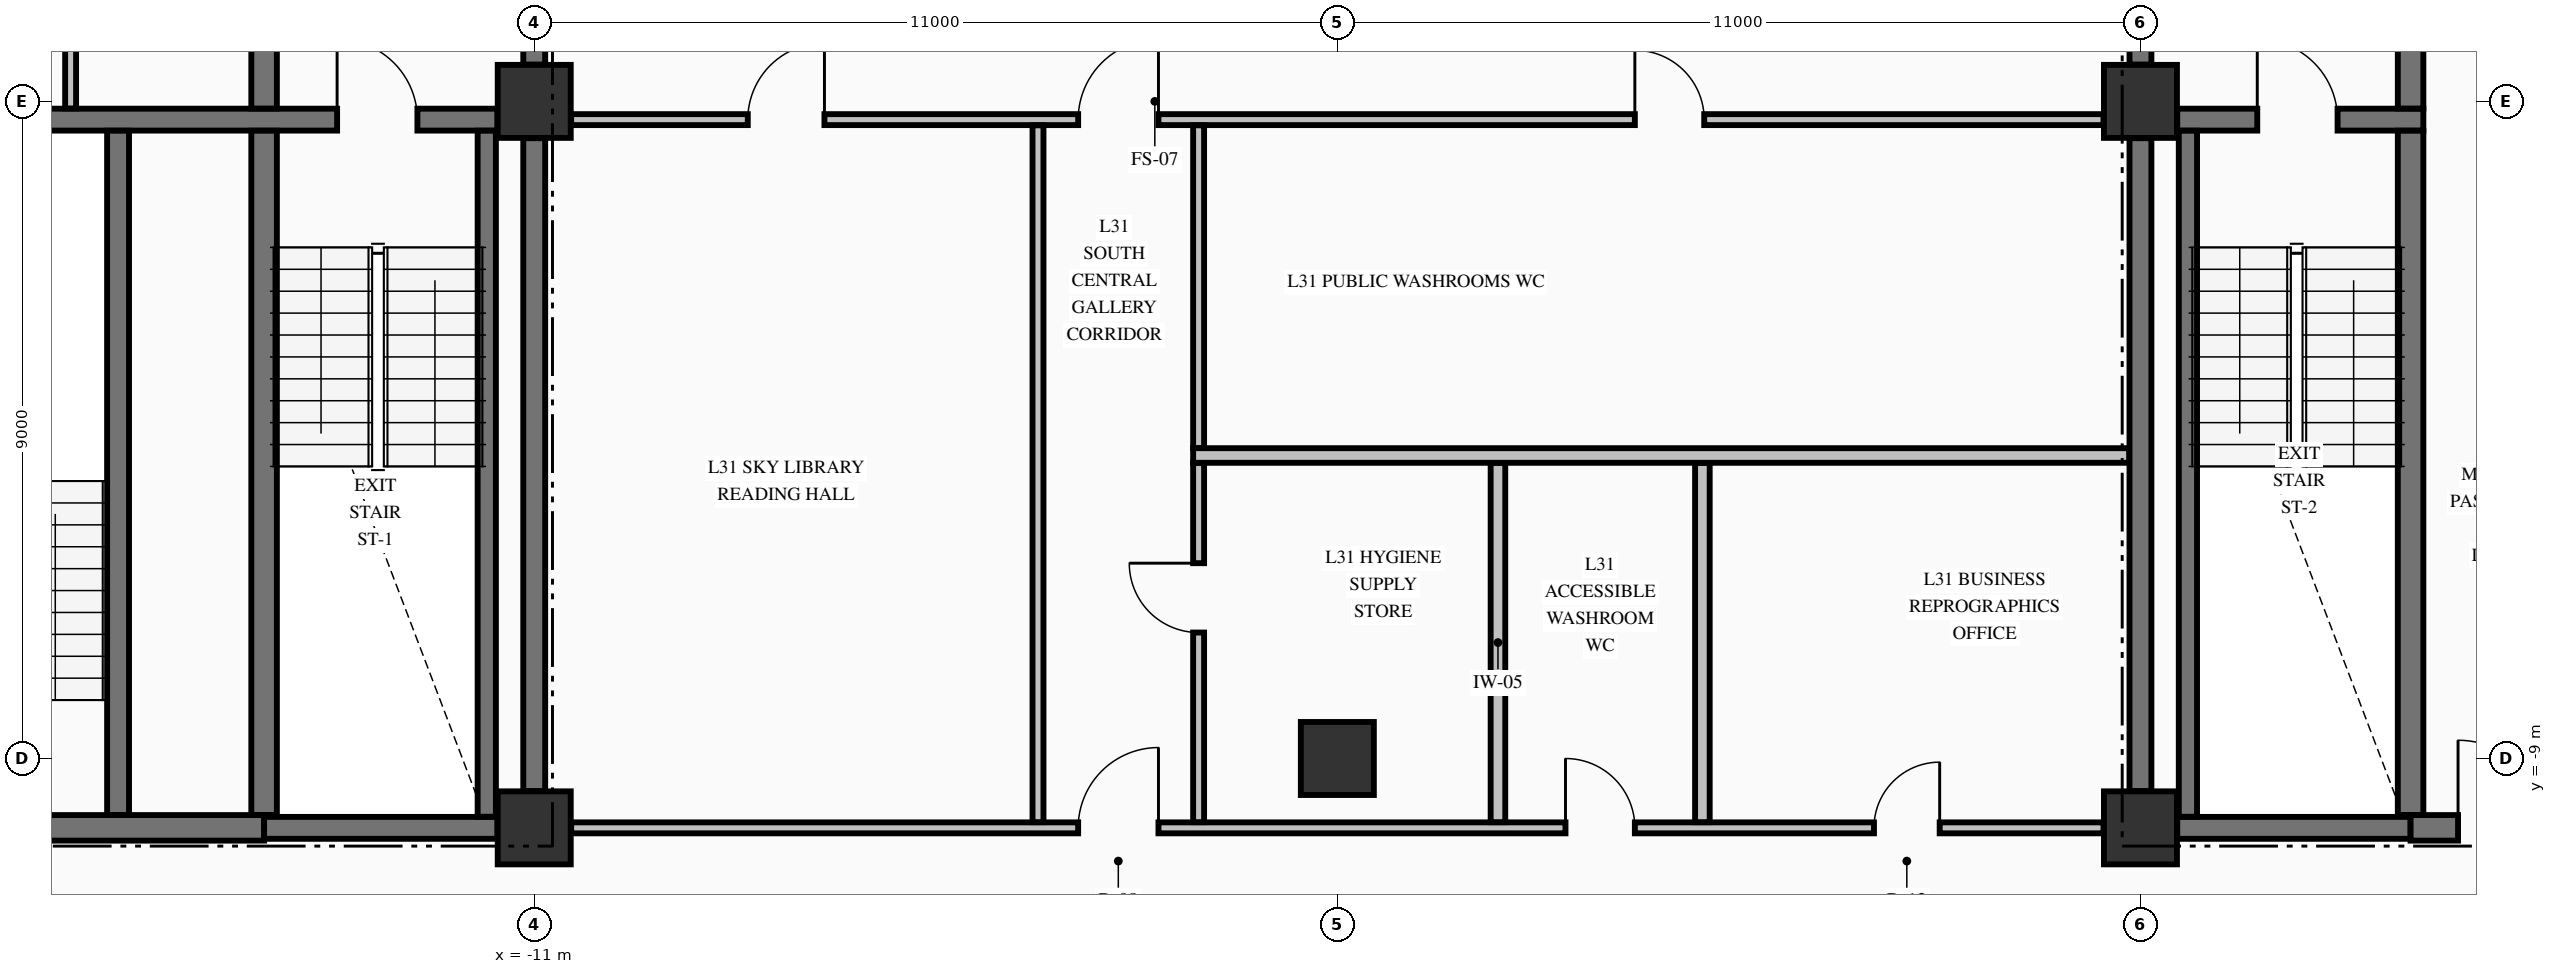
"""IFC4 building model, lengths in metres.
Left out: names, types, materials, properties, quantities, classifications, styles, units other than length and angle.
Written with IfcOpenShell. Run it as: python <this file> out.ifc"""

import sys

from ifc_helpers import new_model, si_unit, direction, frame, frame_2d, origin, origin_2d, place, context, subcontext, project, spatial, rectangle, extrude, element, fill, save


model = new_model("IFC4")
c1 = context("Model", 3, precision=1e-05, world=origin(), true_north=direction((0.0, 1.0)))
c2 = subcontext(c1, "Body", "Model", "MODEL_VIEW")
j1 = project(units=[si_unit("LENGTHUNIT", "METRE"), si_unit("PLANEANGLEUNIT", "RADIAN")], contexts=[c1])
p1 = place(None, origin())
s1 = spatial("IfcSite", under=j1, at=p1, CompositionType="ELEMENT")
p2 = place(p1, origin())
s2 = spatial("IfcBuilding", under=s1, at=p2, CompositionType="ELEMENT")
p3 = place(p2, frame((0.0, 0.0, 124.92)))
s3 = spatial("IfcBuildingStorey", under=s2, at=p3, CompositionType="ELEMENT", Elevation=124.92)
for number, where, z_axis, x_axis in (
    (1, (-11.0, -9.95, -0.25), (0.0, 0.0, 1.0), (1.0, 0.0, 0.0)),
    (2, (-11.0, 0.0, -0.25), (0.0, 0.0, 1.0), (1.0, 0.0, 0.0)),
    (3, (11.0, -9.95, -0.25), (0.0, 0.0, 1.0), (1.0, 0.0, 0.0)),
    (4, (11.0, 0.0, -0.25), (0.0, 0.0, 1.0), (1.0, 0.0, 0.0)),
    (5, (0.0, -9.0, -0.25), (0.0, 0.0, 1.0), (1.0, 0.0, 0.0)),
):
    element("IfcColumn", number, at=place(p3, frame(where, z_axis=z_axis, x_axis=x_axis)), inside=s3, PredefinedType="COLUMN", context=c2, shape_type="SweptSolid", body=[
        extrude(rectangle(XDim=1.0, YDim=1.0, at=origin_2d()), origin(), (0.0, 0.0, 1.0), 3.57),
    ])
p4 = place(p3, frame((-19.496, -9.95, 0.0), z_axis=(0.0, 0.0, 1.0), x_axis=(1.0, 0.0, 0.0)))
e6 = element("IfcWall", 6, at=p4, inside=s3, PredefinedType="SHEAR", context=c2, shape_type="SweptSolid", body=[
    extrude(rectangle(XDim=4.796, YDim=0.35, at=frame_2d((2.398, 0.0))), origin(), (0.0, 0.0, 1.0), 3.32),
])
p5 = place(p4, frame((0.671, 0.0, 0.0)))
e7 = element("IfcOpeningElement", 7, at=p5, cuts=e6, PredefinedType="OPENING", context=c2, shape_type="SweptSolid", body=[
    extrude(rectangle(XDim=1.05, YDim=2.15, at=frame_2d((0.525, 1.075))), frame((0.0, 0.185, 0.0), z_axis=(0.0, -1.0, 0.0), x_axis=(1.0, 0.0, 0.0)), (0.0, 0.0, 1.0), 0.37),
])
for number, where, z_axis, x_axis in (
    (8, (-14.7, -9.95, 0.0), (0.0, 0.0, 1.0), (1.0, 0.0, 0.0)),
    (9, (11.504, -9.95, 0.0), (0.0, 0.0, 1.0), (1.0, 0.0, 0.0)),
):
    element("IfcWall", number, at=place(p3, frame(where, z_axis=z_axis, x_axis=x_axis)), inside=s3, PredefinedType="SHEAR", context=c2, shape_type="SweptSolid", body=[
        extrude(rectangle(XDim=3.196, YDim=0.3, at=frame_2d((1.598, 0.0))), origin(), (0.0, 0.0, 1.0), 3.32),
    ])
p6 = place(p3, frame((14.7, -9.95, 0.0), z_axis=(0.0, 0.0, 1.0), x_axis=(1.0, 0.0, 0.0)))
e10 = element("IfcWall", 10, at=p6, inside=s3, PredefinedType="SHEAR", context=c2, shape_type="SweptSolid", body=[
    extrude(rectangle(XDim=4.796, YDim=0.35, at=frame_2d((2.398, 0.0))), origin(), (0.0, 0.0, 1.0), 3.32),
])
p7 = place(p6, frame((0.65, 0.0, 0.0)))
e11 = element("IfcOpeningElement", 11, at=p7, cuts=e10, PredefinedType="OPENING", context=c2, shape_type="SweptSolid", body=[
    extrude(rectangle(XDim=1.2, YDim=2.15, at=frame_2d((0.6, 1.075))), frame((0.0, 0.185, 0.0), z_axis=(0.0, -1.0, 0.0), x_axis=(1.0, 0.0, 0.0)), (0.0, 0.0, 1.0), 0.37),
])
p8 = place(p3, frame((-19.496, -0.25, 0.0), z_axis=(0.0, 0.0, 1.0), x_axis=(1.0, 0.0, 0.0)))
e12 = element("IfcWall", 12, at=p8, inside=s3, PredefinedType="SHEAR", context=c2, shape_type="SweptSolid", body=[
    extrude(rectangle(XDim=7.992, YDim=0.3, at=frame_2d((3.996, 0.0))), origin(), (0.0, 0.0, 1.0), 3.32),
])
p9 = place(p8, frame((5.796, 0.0, 0.0)))
e13 = element("IfcOpeningElement", 13, at=p9, cuts=e12, PredefinedType="OPENING", context=c2, shape_type="SweptSolid", body=[
    extrude(rectangle(XDim=1.1, YDim=2.15, at=frame_2d((0.55, 1.075))), frame((0.0, 0.16, 0.0), z_axis=(0.0, -1.0, 0.0), x_axis=(1.0, 0.0, 0.0)), (0.0, 0.0, 1.0), 0.32),
])
p10 = place(p3, frame((11.504, -0.25, 0.0), z_axis=(0.0, 0.0, 1.0), x_axis=(1.0, 0.0, 0.0)))
e14 = element("IfcWall", 14, at=p10, inside=s3, PredefinedType="SHEAR", context=c2, shape_type="SweptSolid", body=[
    extrude(rectangle(XDim=3.371, YDim=0.3, at=frame_2d((1.686, 0.0))), origin(), (0.0, 0.0, 1.0), 3.32),
])
p11 = place(p10, frame((1.096, 0.0, 0.0)))
e15 = element("IfcOpeningElement", 15, at=p11, cuts=e14, PredefinedType="OPENING", context=c2, shape_type="SweptSolid", body=[
    extrude(rectangle(XDim=1.1, YDim=2.15, at=frame_2d((0.55, 1.075))), frame((0.0, 0.16, 0.0), z_axis=(0.0, -1.0, 0.0), x_axis=(1.0, 0.0, 0.0)), (0.0, 0.0, 1.0), 0.32),
])
p12 = place(p3, frame((-10.494, -9.95, 0.0), z_axis=(0.0, 0.0, 1.0), x_axis=(1.0, 0.0, 0.0)))
e16 = element("IfcWall", 16, at=p12, inside=s3, PredefinedType="PARTITIONING", context=c2, shape_type="SweptSolid", body=[
    extrude(rectangle(XDim=20.988, YDim=0.15, at=frame_2d((10.494, 0.0))), origin(), (0.0, 0.0, 1.0), 3.32),
])
p13 = place(p12, frame((6.944, 0.0, 0.0)))
e17 = element("IfcOpeningElement", 17, at=p13, cuts=e16, PredefinedType="OPENING", context=c2, shape_type="SweptSolid", body=[
    extrude(rectangle(XDim=1.1, YDim=2.15, at=frame_2d((0.55, 1.075))), frame((0.0, 0.085, 0.0), z_axis=(0.0, -1.0, 0.0), x_axis=(1.0, 0.0, 0.0)), (0.0, 0.0, 1.0), 0.17),
])
p14 = place(p12, frame((13.619, 0.0, 0.0)))
e18 = element("IfcOpeningElement", 18, at=p14, cuts=e16, PredefinedType="OPENING", context=c2, shape_type="SweptSolid", body=[
    extrude(rectangle(XDim=0.95, YDim=2.15, at=frame_2d((0.475, 1.075))), frame((0.0, 0.085, 0.0), z_axis=(0.0, -1.0, 0.0), x_axis=(1.0, 0.0, 0.0)), (0.0, 0.0, 1.0), 0.17),
])
p15 = place(p12, frame((17.844, 0.0, 0.0)))
e19 = element("IfcOpeningElement", 19, at=p15, cuts=e16, PredefinedType="OPENING", context=c2, shape_type="SweptSolid", body=[
    extrude(rectangle(XDim=0.9, YDim=2.15, at=frame_2d((0.45, 1.075))), frame((0.0, 0.085, 0.0), z_axis=(0.0, -1.0, 0.0), x_axis=(1.0, 0.0, 0.0)), (0.0, 0.0, 1.0), 0.17),
])
p16 = place(p3, frame((-1.975, -4.85, 0.0), z_axis=(0.0, 0.0, 1.0), x_axis=(1.0, 0.0, 0.0)))
e20 = element("IfcWall", 20, at=p16, inside=s3, PredefinedType="PARTITIONING", context=c2, shape_type="SweptSolid", body=[
    extrude(rectangle(XDim=12.822, YDim=0.2, at=frame_2d((6.411, 0.0))), origin(), (0.0, 0.0, 1.0), 3.32),
])
p17 = place(p3, frame((-10.494, -0.25, 0.0), z_axis=(0.0, 0.0, 1.0), x_axis=(1.0, 0.0, 0.0)))
e21 = element("IfcWall", 21, at=p17, inside=s3, PredefinedType="PARTITIONING", context=c2, shape_type="SweptSolid", body=[
    extrude(rectangle(XDim=20.988, YDim=0.15, at=frame_2d((10.494, 0.0))), origin(), (0.0, 0.0, 1.0), 3.32),
])
p18 = place(p17, frame((6.944, 0.0, 0.0)))
e22 = element("IfcOpeningElement", 22, at=p18, cuts=e21, PredefinedType="OPENING", context=c2, shape_type="SweptSolid", body=[
    extrude(rectangle(XDim=1.1, YDim=2.15, at=frame_2d((0.55, 1.075))), frame((0.0, 0.085, 0.0), z_axis=(0.0, -1.0, 0.0), x_axis=(1.0, 0.0, 0.0)), (0.0, 0.0, 1.0), 0.17),
])
p19 = place(p17, frame((2.419, 0.0, 0.0)))
e23 = element("IfcOpeningElement", 23, at=p19, cuts=e21, PredefinedType="OPENING", context=c2, shape_type="SweptSolid", body=[
    extrude(rectangle(XDim=1.05, YDim=2.15, at=frame_2d((0.525, 1.075))), frame((0.0, 0.085, 0.0), z_axis=(0.0, -1.0, 0.0), x_axis=(1.0, 0.0, 0.0)), (0.0, 0.0, 1.0), 0.17),
])
p20 = place(p17, frame((14.569, 0.0, 0.0)))
e24 = element("IfcOpeningElement", 24, at=p20, cuts=e21, PredefinedType="OPENING", context=c2, shape_type="SweptSolid", body=[
    extrude(rectangle(XDim=0.95, YDim=2.15, at=frame_2d((0.475, 1.075))), frame((0.0, 0.085, 0.0), z_axis=(0.0, -1.0, 0.0), x_axis=(1.0, 0.0, 0.0)), (0.0, 0.0, 1.0), 0.17),
])
p21 = place(p3, frame((-16.7, -9.773, 0.0), z_axis=(0.0, 0.0, 1.0), x_axis=(0.0, 1.0, 0.0)))
e25 = element("IfcWall", 25, at=p21, inside=s3, PredefinedType="SHEAR", context=c2, shape_type="SweptSolid", body=[
    extrude(rectangle(XDim=9.371, YDim=0.3, at=frame_2d((4.686, 0.0))), origin(), (0.0, 0.0, 1.0), 3.32),
])
p22 = place(p3, frame((-14.7, -9.773, 0.0), z_axis=(0.0, 0.0, 1.0), x_axis=(0.0, 1.0, 0.0)))
e26 = element("IfcWall", 26, at=p22, inside=s3, PredefinedType="SHEAR", context=c2, shape_type="SweptSolid", body=[
    extrude(rectangle(XDim=9.371, YDim=0.35, at=frame_2d((4.686, 0.0))), origin(), (0.0, 0.0, 1.0), 3.32),
])
p23 = place(p3, frame((-14.7, -0.098, 0.0), z_axis=(0.0, 0.0, 1.0), x_axis=(0.0, 1.0, 0.0)))
e27 = element("IfcWall", 27, at=p23, inside=s3, PredefinedType="SHEAR", context=c2, shape_type="SweptSolid", body=[
    extrude(rectangle(XDim=2.846, YDim=0.35, at=frame_2d((1.423, 0.0))), origin(), (0.0, 0.0, 1.0), 3.32),
])
p24 = place(p3, frame((-11.65, -9.798, 0.0), z_axis=(0.0, 0.0, 1.0), x_axis=(0.0, 1.0, 0.0)))
e28 = element("IfcWall", 28, at=p24, inside=s3, PredefinedType="SOLIDWALL", context=c2, shape_type="SweptSolid", body=[
    extrude(rectangle(XDim=9.396, YDim=0.25, at=frame_2d((4.698, 0.0))), origin(), (0.0, 0.0, 1.0), 3.32),
])
p25 = place(p3, frame((-11.0, -9.446, 0.0), z_axis=(0.0, 0.0, 1.0), x_axis=(0.0, 1.0, 0.0)))
e29 = element("IfcWall", 29, at=p25, inside=s3, PredefinedType="SHEAR", context=c2, shape_type="SweptSolid", body=[
    extrude(rectangle(XDim=8.942, YDim=0.3, at=frame_2d((4.471, 0.0))), origin(), (0.0, 0.0, 1.0), 3.32),
])
p26 = place(p3, frame((-11.0, 0.504, 0.0), z_axis=(0.0, 0.0, 1.0), x_axis=(0.0, 1.0, 0.0)))
e30 = element("IfcWall", 30, at=p26, inside=s3, PredefinedType="SHEAR", context=c2, shape_type="SweptSolid", body=[
    extrude(rectangle(XDim=2.244, YDim=0.3, at=frame_2d((1.122, 0.0))), origin(), (0.0, 0.0, 1.0), 3.32),
])
p27 = place(p26, frame((0.596, 0.0, 0.0)))
e31 = element("IfcOpeningElement", 31, at=p27, cuts=e30, PredefinedType="OPENING", context=c2, shape_type="SweptSolid", body=[
    extrude(rectangle(XDim=1.1, YDim=2.15, at=frame_2d((0.55, 1.075))), frame((0.0, 0.16, 0.0), z_axis=(0.0, -1.0, 0.0), x_axis=(1.0, 0.0, 0.0)), (0.0, 0.0, 1.0), 0.32),
])
p28 = place(p3, frame((11.0, -9.446, 0.0), z_axis=(0.0, 0.0, 1.0), x_axis=(0.0, 1.0, 0.0)))
e32 = element("IfcWall", 32, at=p28, inside=s3, PredefinedType="SHEAR", context=c2, shape_type="SweptSolid", body=[
    extrude(rectangle(XDim=8.942, YDim=0.3, at=frame_2d((4.471, 0.0))), origin(), (0.0, 0.0, 1.0), 3.32),
])
p29 = place(p3, frame((11.0, 0.504, 0.0), z_axis=(0.0, 0.0, 1.0), x_axis=(0.0, 1.0, 0.0)))
e33 = element("IfcWall", 33, at=p29, inside=s3, PredefinedType="SHEAR", context=c2, shape_type="SweptSolid", body=[
    extrude(rectangle(XDim=2.244, YDim=0.3, at=frame_2d((1.122, 0.0))), origin(), (0.0, 0.0, 1.0), 3.32),
])
p30 = place(p29, frame((0.596, 0.0, 0.0)))
e34 = element("IfcOpeningElement", 34, at=p30, cuts=e33, PredefinedType="OPENING", context=c2, shape_type="SweptSolid", body=[
    extrude(rectangle(XDim=1.1, YDim=2.15, at=frame_2d((0.55, 1.075))), frame((0.0, 0.16, 0.0), z_axis=(0.0, -1.0, 0.0), x_axis=(1.0, 0.0, 0.0)), (0.0, 0.0, 1.0), 0.32),
])
p31 = place(p3, frame((11.65, -9.798, 0.0), z_axis=(0.0, 0.0, 1.0), x_axis=(0.0, 1.0, 0.0)))
e35 = element("IfcWall", 35, at=p31, inside=s3, PredefinedType="SOLIDWALL", context=c2, shape_type="SweptSolid", body=[
    extrude(rectangle(XDim=9.396, YDim=0.25, at=frame_2d((4.698, 0.0))), origin(), (0.0, 0.0, 1.0), 3.32),
])
p32 = place(p3, frame((14.7, -9.773, 0.0), z_axis=(0.0, 0.0, 1.0), x_axis=(0.0, 1.0, 0.0)))
e36 = element("IfcWall", 36, at=p32, inside=s3, PredefinedType="SHEAR", context=c2, shape_type="SweptSolid", body=[
    extrude(rectangle(XDim=9.371, YDim=0.35, at=frame_2d((4.686, 0.0))), origin(), (0.0, 0.0, 1.0), 3.32),
])
p33 = place(p3, frame((14.7, -0.098, 0.0), z_axis=(0.0, 0.0, 1.0), x_axis=(0.0, 1.0, 0.0)))
e37 = element("IfcWall", 37, at=p33, inside=s3, PredefinedType="SHEAR", context=c2, shape_type="SweptSolid", body=[
    extrude(rectangle(XDim=2.846, YDim=0.35, at=frame_2d((1.423, 0.0))), origin(), (0.0, 0.0, 1.0), 3.32),
])
p34 = place(p3, frame((-17.35, -0.097, 0.0), z_axis=(0.0, 0.0, 1.0), x_axis=(0.0, 1.0, 0.0)))
e38 = element("IfcWall", 38, at=p34, inside=s3, PredefinedType="PARTITIONING", context=c2, shape_type="SweptSolid", body=[
    extrude(rectangle(XDim=10.419, YDim=0.15, at=frame_2d((5.209, 0.0))), origin(), (0.0, 0.0, 1.0), 3.32),
])
p35 = place(p3, frame((-4.1, -9.872, 0.0), z_axis=(0.0, 0.0, 1.0), x_axis=(0.0, 1.0, 0.0)))
e39 = element("IfcWall", 39, at=p35, inside=s3, PredefinedType="PARTITIONING", context=c2, shape_type="SweptSolid", body=[
    extrude(rectangle(XDim=9.544, YDim=0.15, at=frame_2d((4.772, 0.0))), origin(), (0.0, 0.0, 1.0), 3.32),
])
p36 = place(p3, frame((-1.9, -9.872, 0.0), z_axis=(0.0, 0.0, 1.0), x_axis=(0.0, 1.0, 0.0)))
e40 = element("IfcWall", 40, at=p36, inside=s3, PredefinedType="PARTITIONING", context=c2, shape_type="SweptSolid", body=[
    extrude(rectangle(XDim=4.919, YDim=0.15, at=frame_2d((2.459, 0.0))), origin(), (0.0, 0.0, 1.0), 3.32),
])
p37 = place(p36, frame((2.597, 0.0, 0.0)))
e41 = element("IfcOpeningElement", 41, at=p37, cuts=e40, PredefinedType="OPENING", context=c2, shape_type="SweptSolid", body=[
    extrude(rectangle(XDim=0.95, YDim=2.15, at=frame_2d((0.475, 1.075))), frame((0.0, 0.085, 0.0), z_axis=(0.0, -1.0, 0.0), x_axis=(1.0, 0.0, 0.0)), (0.0, 0.0, 1.0), 0.17),
])
p38 = place(p3, frame((-1.9, -4.747, 0.0), z_axis=(0.0, 0.0, 1.0), x_axis=(0.0, 1.0, 0.0)))
e42 = element("IfcWall", 42, at=p38, inside=s3, PredefinedType="PARTITIONING", context=c2, shape_type="SweptSolid", body=[
    extrude(rectangle(XDim=4.419, YDim=0.15, at=frame_2d((2.209, 0.0))), origin(), (0.0, 0.0, 1.0), 3.32),
])
for number, where, z_axis, x_axis in (
    (43, (2.2, -9.872, 0.0), (0.0, 0.0, 1.0), (0.0, 1.0, 0.0)),
    (44, (5.0, -9.872, 0.0), (0.0, 0.0, 1.0), (0.0, 1.0, 0.0)),
):
    element("IfcWall", number, at=place(p3, frame(where, z_axis=z_axis, x_axis=x_axis)), inside=s3, PredefinedType="PARTITIONING", context=c2, shape_type="SweptSolid", body=[
        extrude(rectangle(XDim=4.919, YDim=0.2, at=frame_2d((2.459, 0.0))), origin(), (0.0, 0.0, 1.0), 3.32),
    ])
p39 = place(p9, origin())
e45 = element("IfcDoor", 45, at=p39, inside=s3, OperationType="SINGLE_SWING_LEFT", PredefinedType="DOOR", context=c2, shape_type="SweptSolid", body=[
    extrude(rectangle(XDim=1.1, YDim=2.15, at=frame_2d((0.55, 1.075))), frame((0.0, 0.025, 0.0), z_axis=(0.0, -1.0, 0.0), x_axis=(1.0, 0.0, 0.0)), (0.0, 0.0, 1.0), 0.05),
])
fill(e13, e45)
p40 = place(p11, origin())
e46 = element("IfcDoor", 46, at=p40, inside=s3, OperationType="SINGLE_SWING_LEFT", PredefinedType="DOOR", context=c2, shape_type="SweptSolid", body=[
    extrude(rectangle(XDim=1.1, YDim=2.15, at=frame_2d((0.55, 1.075))), frame((0.0, 0.025, 0.0), z_axis=(0.0, -1.0, 0.0), x_axis=(1.0, 0.0, 0.0)), (0.0, 0.0, 1.0), 0.05),
])
fill(e15, e46)
p41 = place(p7, origin())
e47 = element("IfcDoor", 47, at=p41, inside=s3, OperationType="SINGLE_SWING_LEFT", PredefinedType="DOOR", context=c2, shape_type="SweptSolid", body=[
    extrude(rectangle(XDim=1.2, YDim=2.15, at=frame_2d((0.6, 1.075))), frame((0.0, 0.025, 0.0), z_axis=(0.0, -1.0, 0.0), x_axis=(1.0, 0.0, 0.0)), (0.0, 0.0, 1.0), 0.05),
])
fill(e11, e47)
p42 = place(p13, origin())
e48 = element("IfcDoor", 48, at=p42, inside=s3, OperationType="SINGLE_SWING_RIGHT", PredefinedType="DOOR", context=c2, shape_type="SweptSolid", body=[
    extrude(rectangle(XDim=1.1, YDim=2.15, at=frame_2d((0.55, 1.075))), frame((0.0, 0.025, 0.0), z_axis=(0.0, -1.0, 0.0), x_axis=(1.0, 0.0, 0.0)), (0.0, 0.0, 1.0), 0.05),
])
fill(e17, e48)
p43 = place(p18, origin())
e49 = element("IfcDoor", 49, at=p43, inside=s3, OperationType="SINGLE_SWING_RIGHT", PredefinedType="DOOR", context=c2, shape_type="SweptSolid", body=[
    extrude(rectangle(XDim=1.1, YDim=2.15, at=frame_2d((0.55, 1.075))), frame((0.0, 0.025, 0.0), z_axis=(0.0, -1.0, 0.0), x_axis=(1.0, 0.0, 0.0)), (0.0, 0.0, 1.0), 0.05),
])
fill(e22, e49)
p44 = place(p19, origin())
e50 = element("IfcDoor", 50, at=p44, inside=s3, OperationType="SINGLE_SWING_RIGHT", PredefinedType="DOOR", context=c2, shape_type="SweptSolid", body=[
    extrude(rectangle(XDim=1.05, YDim=2.15, at=frame_2d((0.525, 1.075))), frame((0.0, 0.025, 0.0), z_axis=(0.0, -1.0, 0.0), x_axis=(1.0, 0.0, 0.0)), (0.0, 0.0, 1.0), 0.05),
])
fill(e23, e50)
p45 = place(p20, origin())
e51 = element("IfcDoor", 51, at=p45, inside=s3, OperationType="SINGLE_SWING_LEFT", PredefinedType="DOOR", context=c2, shape_type="SweptSolid", body=[
    extrude(rectangle(XDim=0.95, YDim=2.15, at=frame_2d((0.475, 1.075))), frame((0.0, 0.025, 0.0), z_axis=(0.0, -1.0, 0.0), x_axis=(1.0, 0.0, 0.0)), (0.0, 0.0, 1.0), 0.05),
])
fill(e24, e51)
p46 = place(p37, origin())
e52 = element("IfcDoor", 52, at=p46, inside=s3, OperationType="SINGLE_SWING_RIGHT", PredefinedType="DOOR", context=c2, shape_type="SweptSolid", body=[
    extrude(rectangle(XDim=0.95, YDim=2.15, at=frame_2d((0.475, 1.075))), frame((0.0, 0.025, 0.0), z_axis=(0.0, -1.0, 0.0), x_axis=(1.0, 0.0, 0.0)), (0.0, 0.0, 1.0), 0.05),
])
fill(e41, e52)
p47 = place(p14, origin())
e53 = element("IfcDoor", 53, at=p47, inside=s3, OperationType="SINGLE_SWING_LEFT", PredefinedType="DOOR", context=c2, shape_type="SweptSolid", body=[
    extrude(rectangle(XDim=0.95, YDim=2.15, at=frame_2d((0.475, 1.075))), frame((0.0, 0.025, 0.0), z_axis=(0.0, -1.0, 0.0), x_axis=(1.0, 0.0, 0.0)), (0.0, 0.0, 1.0), 0.05),
])
fill(e18, e53)
p48 = place(p15, origin())
e54 = element("IfcDoor", 54, at=p48, inside=s3, OperationType="SINGLE_SWING_RIGHT", PredefinedType="DOOR", context=c2, shape_type="SweptSolid", body=[
    extrude(rectangle(XDim=0.9, YDim=2.15, at=frame_2d((0.45, 1.075))), frame((0.0, 0.025, 0.0), z_axis=(0.0, -1.0, 0.0), x_axis=(1.0, 0.0, 0.0)), (0.0, 0.0, 1.0), 0.05),
])
fill(e19, e54)
save(model, sys.argv[1])
